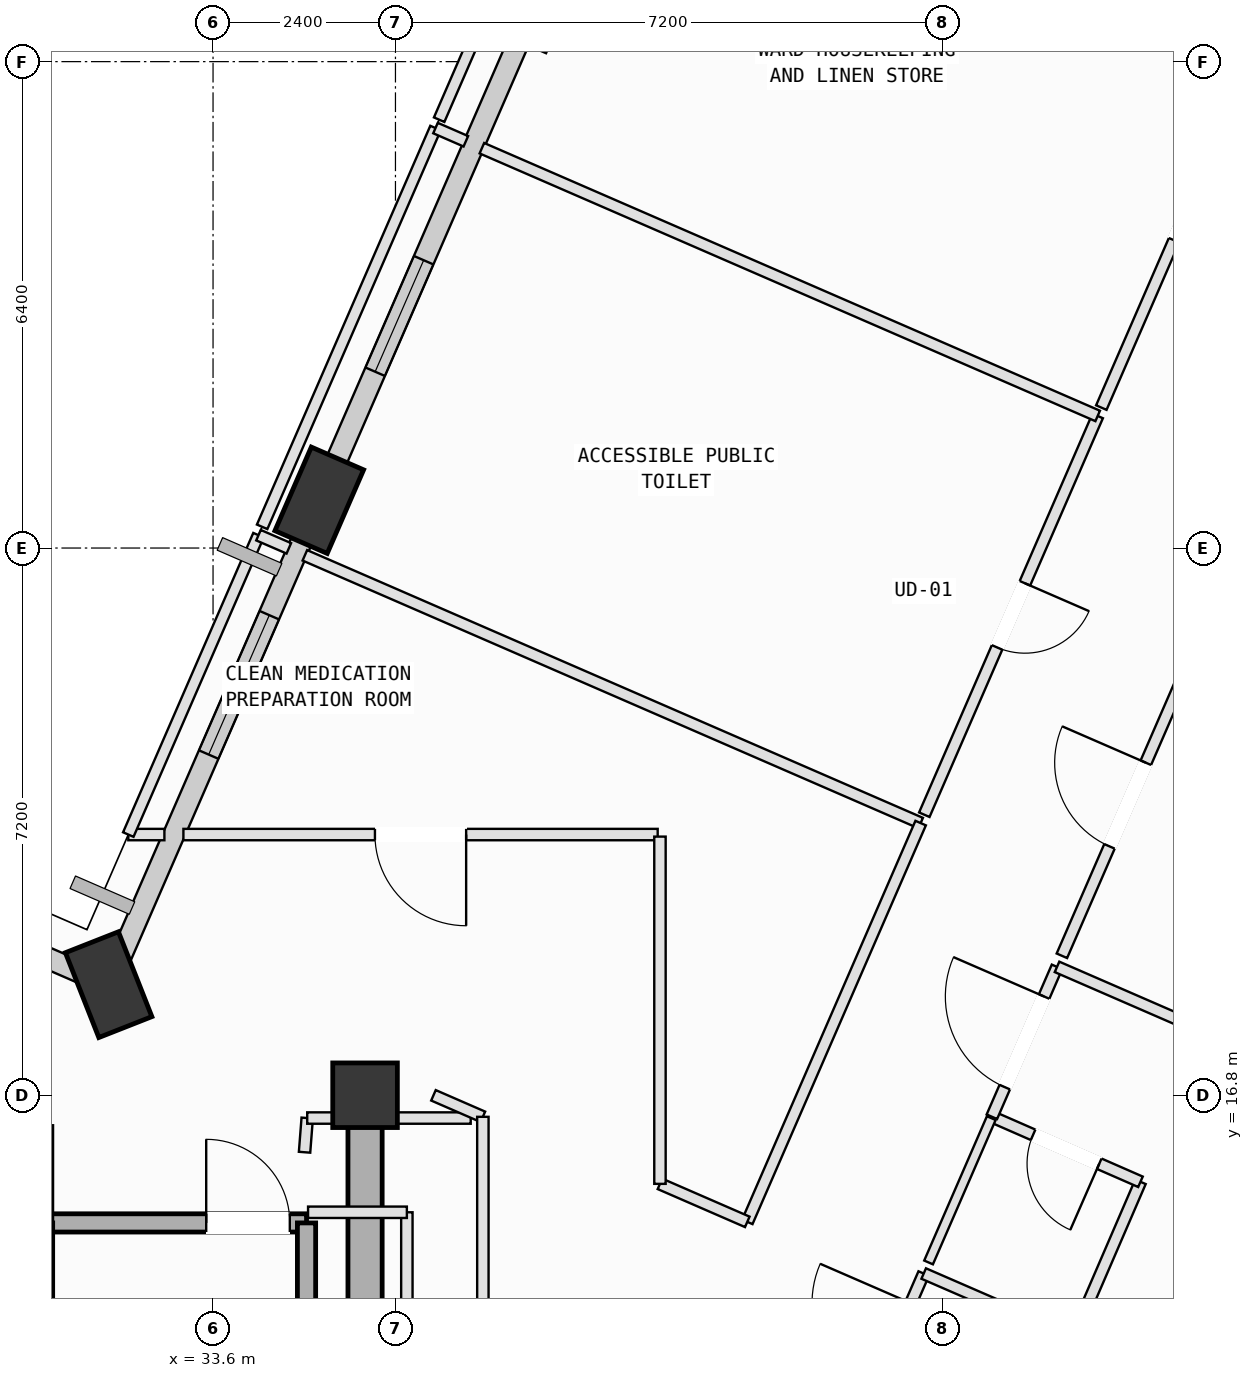
"""IFC4 building model, lengths in metres.
Left out: names, types, materials, properties, quantities, classifications, styles, units other than length and angle.
Written with IfcOpenShell. Run it as: python <this file> out.ifc"""

import sys

from ifc_helpers import new_model, si_unit, direction, frame, frame_2d, origin, origin_2d, place, context, subcontext, project, spatial, rectangle, extrude, element, fill, save


model = new_model("IFC4")
c1 = context("Model", 3, precision=1e-05, world=origin(), true_north=direction((0.0, 1.0)))
c2 = subcontext(c1, "Body", "Model", "MODEL_VIEW")
j1 = project(units=[si_unit("LENGTHUNIT", "METRE"), si_unit("PLANEANGLEUNIT", "RADIAN")], contexts=[c1])
p1 = place(None, origin())
s1 = spatial("IfcSite", under=j1, at=p1, CompositionType="ELEMENT")
p2 = place(p1, origin())
s2 = spatial("IfcBuilding", under=s1, at=p2, CompositionType="ELEMENT")
p3 = place(p2, frame((0.0, 0.0, 320.6)))
s3 = spatial("IfcBuildingStorey", under=s2, at=p3, CompositionType="ELEMENT", Elevation=320.6)
p4 = place(p3, frame((35.6, 16.8, 0.0), z_axis=(0.0, 0.0, 1.0), x_axis=(1.0, 0.0, 0.0)))
e1 = element("IfcColumn", 1, at=p4, inside=s3, PredefinedType="COLUMN", context=c2, shape_type="SweptSolid", body=[
    extrude(rectangle(XDim=0.85, YDim=0.85, at=origin_2d()), origin(), (0.0, 0.0, 1.0), 4.0),
])
for number, where, z_axis, x_axis in (
    (2, (34.998, 24.628, 0.002), (0.0, 0.0, 1.0), (0.399, 0.917, 0.0)),
    (3, (32.226, 18.255, 0.002), (0.0, 0.0, 1.0), (-0.367, 0.93, 0.0)),
):
    element("IfcColumn", number, at=place(p3, frame(where, z_axis=z_axis, x_axis=x_axis)), inside=s3, PredefinedType="COLUMN", context=c2, shape_type="SweptSolid", body=[
        extrude(rectangle(XDim=1.2, YDim=0.75, at=origin_2d()), origin(), (0.0, 0.0, 1.0), 3.996),
    ])
p5 = place(p3, frame((35.156, 24.993, 0.0), z_axis=(0.0, 0.0, 1.0), x_axis=(0.398758169539, 0.917056117272, 0.0)))
e4 = element("IfcWall", 4, at=p5, inside=s3, PredefinedType="SOLIDWALL", context=c2, shape_type="SweptSolid", body=[
    extrude(rectangle(XDim=6.405, YDim=0.28, at=frame_2d((3.202, 0.0))), origin(), (0.0, 0.0, 1.0), 3.265),
])
p6 = place(p5, frame((1.447, 0.0, 0.75)))
e5 = element("IfcOpeningElement", 5, at=p6, cuts=e4, PredefinedType="OPENING", context=c2, shape_type="SweptSolid", body=[
    extrude(rectangle(XDim=1.6, YDim=1.95, at=frame_2d((0.8, 0.975))), frame((0.0, 0.15, 0.0), z_axis=(0.0, -1.0, 0.0), x_axis=(1.0, 0.0, 0.0)), (0.0, 0.0, 1.0), 0.3),
])
p7 = place(p3, frame((32.385, 18.619, 0.0), z_axis=(0.0, 0.0, 1.0), x_axis=(0.398753668733, 0.917058074318, 0.0)))
e6 = element("IfcWall", 6, at=p7, inside=s3, PredefinedType="SOLIDWALL", context=c2, shape_type="SweptSolid", body=[
    extrude(rectangle(XDim=6.155, YDim=0.28, at=frame_2d((3.078, 0.0))), origin(), (0.0, 0.0, 1.0), 3.265),
])
p8 = place(p7, frame((2.904, 0.0, 0.75)))
e7 = element("IfcOpeningElement", 7, at=p8, cuts=e6, PredefinedType="OPENING", context=c2, shape_type="SweptSolid", body=[
    extrude(rectangle(XDim=2.0, YDim=1.95, at=frame_2d((1.0, 0.975))), frame((0.0, 0.15, 0.0), z_axis=(0.0, -1.0, 0.0), x_axis=(1.0, 0.0, 0.0)), (0.0, 0.0, 1.0), 0.3),
])
p9 = place(p3, frame((25.484, 21.187, 0.0), z_axis=(0.0, 0.0, 1.0), x_axis=(0.917060568388, -0.398747932794, 0.0)))
e8 = element("IfcWall", 8, at=p9, inside=s3, PredefinedType="SOLIDWALL", context=c2, shape_type="SweptSolid", body=[
    extrude(rectangle(XDim=6.955, YDim=0.28, at=frame_2d((3.478, 0.0))), origin(), (0.0, 0.0, 1.0), 2.765),
])
p10 = place(p3, frame((31.37, 15.12, 0.0), z_axis=(0.0, 0.0, 1.0), x_axis=(1.0, 0.0, 0.0)))
e9 = element("IfcWall", 9, at=p10, inside=s3, PredefinedType="SOLIDWALL", context=c2, shape_type="SweptSolid", body=[
    extrude(rectangle(XDim=3.46, YDim=0.24, at=frame_2d((1.73, 0.0))), origin(), (0.0, 0.0, 1.0), 3.78),
])
p11 = place(p10, frame((2.14, 0.0, 0.0)))
e10 = element("IfcOpeningElement", 10, at=p11, cuts=e9, PredefinedType="OPENING", context=c2, shape_type="SweptSolid", body=[
    extrude(rectangle(XDim=1.1, YDim=2.15, at=frame_2d((0.55, 1.075))), frame((0.0, 0.13, 0.0), z_axis=(0.0, -1.0, 0.0), x_axis=(1.0, 0.0, 0.0)), (0.0, 0.0, 1.0), 0.26),
])
for number, where, z_axis, x_axis in (
    (11, (34.83, 15.12, 0.0), (0.0, 0.0, 1.0), (0.0, -1.0, 0.0)),
    (12, (31.37, 8.025, 0.0), (0.0, 0.0, 1.0), (0.0, 1.0, 0.0)),
):
    element("IfcWall", number, at=place(p3, frame(where, z_axis=z_axis, x_axis=x_axis)), inside=s3, PredefinedType="SOLIDWALL", context=c2, shape_type="SweptSolid", body=[
        extrude(rectangle(XDim=7.095, YDim=0.24, at=frame_2d((3.548, 0.0))), origin(), (0.0, 0.0, 1.0), 3.78),
    ])
p12 = place(p3, frame((35.6, 7.8, 0.0), z_axis=(0.0, 0.0, 1.0), x_axis=(0.0, 1.0, 0.0)))
e13 = element("IfcWall", 13, at=p12, inside=s3, PredefinedType="SHEAR", context=c2, shape_type="SweptSolid", body=[
    extrude(rectangle(XDim=9.0, YDim=0.45, at=frame_2d((4.5, 0.0))), origin(), (0.0, 0.0, 1.0), 3.78),
])
p13 = place(p3, frame((42.093, 12.482, 0.0), z_axis=(0.0, 0.0, 1.0), x_axis=(0.398518519728, 0.917160285574, 0.0)))
e14 = element("IfcWall", 14, at=p13, inside=s3, PredefinedType="PARTITIONING", context=c2, shape_type="SweptSolid", body=[
    extrude(rectangle(XDim=2.15, YDim=0.15, at=frame_2d((1.075, 0.0))), origin(), (0.0, 0.0, 1.0), 3.78),
])
p14 = place(p13, frame((0.425, 0.0, 0.0)))
e15 = element("IfcOpeningElement", 15, at=p14, cuts=e14, PredefinedType="OPENING", context=c2, shape_type="SweptSolid", body=[
    extrude(rectangle(XDim=1.3, YDim=2.15, at=frame_2d((0.65, 1.075))), frame((0.0, 0.085, 0.0), z_axis=(0.0, -1.0, 0.0), x_axis=(1.0, 0.0, 0.0)), (0.0, 0.0, 1.0), 0.17),
])
p15 = place(p3, frame((42.95, 14.454, 0.0), z_axis=(0.0, 0.0, 1.0), x_axis=(0.917043017742, -0.398788294224, 0.0)))
e16 = element("IfcWall", 16, at=p15, inside=s3, PredefinedType="PARTITIONING", context=c2, shape_type="SweptSolid", body=[
    extrude(rectangle(XDim=7.465, YDim=0.15, at=frame_2d((3.733, 0.0))), origin(), (0.0, 0.0, 1.0), 3.78),
])
p16 = place(p3, frame((44.976, 13.747, 0.0), z_axis=(0.0, 0.0, 1.0), x_axis=(0.396236327193, 0.918148557159, 0.0)))
e17 = element("IfcWall", 17, at=p16, inside=s3, PredefinedType="PARTITIONING", context=c2, shape_type="SweptSolid", body=[
    extrude(rectangle(XDim=2.084, YDim=0.15, at=frame_2d((1.042, 0.0))), origin(), (0.0, 0.0, 1.0), 3.78),
])
p17 = place(p3, frame((45.802, 15.661, 0.0), z_axis=(0.0, 0.0, 1.0), x_axis=(-0.916010257987, 0.401154842003, 0.0)))
e18 = element("IfcWall", 18, at=p17, inside=s3, PredefinedType="PARTITIONING", context=c2, shape_type="SweptSolid", body=[
    extrude(rectangle(XDim=2.134, YDim=0.15, at=frame_2d((1.067, 0.0))), origin(), (0.0, 0.0, 1.0), 3.78),
])
p18 = place(p17, frame((0.592, 0.0, 0.0)))
e19 = element("IfcOpeningElement", 19, at=p18, cuts=e18, PredefinedType="OPENING", context=c2, shape_type="SweptSolid", body=[
    extrude(rectangle(XDim=0.95, YDim=2.1, at=frame_2d((0.475, 1.05))), frame((0.0, 0.085, 0.0), z_axis=(0.0, -1.0, 0.0), x_axis=(1.0, 0.0, 0.0)), (0.0, 0.0, 1.0), 0.17),
])
p19 = place(p3, frame((43.847, 16.517, 0.0), z_axis=(0.0, 0.0, 1.0), x_axis=(0.398655528378, 0.917100741301, 0.0)))
e20 = element("IfcWall", 20, at=p19, inside=s3, PredefinedType="PARTITIONING", context=c2, shape_type="SweptSolid", body=[
    extrude(rectangle(XDim=2.15, YDim=0.15, at=frame_2d((1.075, 0.0))), origin(), (0.0, 0.0, 1.0), 3.78),
])
p20 = place(p19, frame((0.425, 0.0, 0.0)))
e21 = element("IfcOpeningElement", 21, at=p20, cuts=e20, PredefinedType="OPENING", context=c2, shape_type="SweptSolid", body=[
    extrude(rectangle(XDim=1.3, YDim=2.15, at=frame_2d((0.65, 1.075))), frame((0.0, 0.085, 0.0), z_axis=(0.0, -1.0, 0.0), x_axis=(1.0, 0.0, 0.0)), (0.0, 0.0, 1.0), 0.17),
])
p21 = place(p3, frame((44.704, 18.489, 0.0), z_axis=(0.0, 0.0, 1.0), x_axis=(0.917037556052, -0.398800853547, 0.0)))
e22 = element("IfcWall", 22, at=p21, inside=s3, PredefinedType="PARTITIONING", context=c2, shape_type="SweptSolid", body=[
    extrude(rectangle(XDim=9.436, YDim=0.15, at=frame_2d((4.718, 0.0))), origin(), (0.0, 0.0, 1.0), 3.78),
])
p22 = place(p3, frame((43.014, 14.6, 0.0), z_axis=(0.0, 0.0, 1.0), x_axis=(0.398553636867, 0.917145025904, 0.0)))
e23 = element("IfcWall", 23, at=p22, inside=s3, PredefinedType="PARTITIONING", context=c2, shape_type="SweptSolid", body=[
    extrude(rectangle(XDim=2.071, YDim=0.125, at=frame_2d((1.035, 0.0))), origin(), (0.0, 0.0, 1.0), 3.78),
])
p23 = place(p3, frame((44.768, 18.635, 0.0), z_axis=(0.0, 0.0, 1.0), x_axis=(0.398828954963, 0.91702533481, 0.0)))
e24 = element("IfcWall", 24, at=p23, inside=s3, PredefinedType="PARTITIONING", context=c2, shape_type="SweptSolid", body=[
    extrude(rectangle(XDim=4.34, YDim=0.15, at=frame_2d((2.17, 0.0))), origin(), (0.0, 0.0, 1.0), 3.415),
])
p24 = place(p23, frame((1.57, 0.0, 0.0)))
e25 = element("IfcOpeningElement", 25, at=p24, cuts=e24, PredefinedType="OPENING", context=c2, shape_type="SweptSolid", body=[
    extrude(rectangle(XDim=1.2, YDim=2.15, at=frame_2d((0.6, 1.075))), frame((0.0, 0.085, 0.0), z_axis=(0.0, -1.0, 0.0), x_axis=(1.0, 0.0, 0.0)), (0.0, 0.0, 1.0), 0.17),
])
p25 = place(p3, frame((34.804, 16.05, 0.0), z_axis=(0.0, 0.0, 1.0), x_axis=(0.077896068279, 0.996961484987, 0.0)))
e26 = element("IfcWall", 26, at=p25, inside=s3, PredefinedType="PARTITIONING", context=c2, shape_type="SweptSolid", body=[
    extrude(rectangle(XDim=0.451, YDim=0.15, at=frame_2d((0.226, 0.0))), origin(), (0.0, 0.0, 1.0), 3.78),
])
p26 = place(p3, frame((34.839, 16.5, 0.0), z_axis=(0.0, 0.0, 1.0), x_axis=(1.0, 0.0, 0.0)))
e27 = element("IfcWall", 27, at=p26, inside=s3, PredefinedType="PARTITIONING", context=c2, shape_type="SweptSolid", body=[
    extrude(rectangle(XDim=2.151, YDim=0.15, at=frame_2d((1.075, 0.0))), origin(), (0.0, 0.0, 1.0), 2.765),
])
p27 = place(p3, frame((36.5, 16.799, 0.0), z_axis=(0.0, 0.0, 1.0), x_axis=(0.916867333156, -0.399192050762, 0.0)))
e28 = element("IfcWall", 28, at=p27, inside=s3, PredefinedType="PARTITIONING", context=c2, shape_type="SweptSolid", body=[
    extrude(rectangle(XDim=0.709, YDim=0.15, at=frame_2d((0.354, 0.0))), origin(), (0.0, 0.0, 1.0), 3.78),
])
p28 = place(p3, frame((37.15, 16.516, 0.0), z_axis=(0.0, 0.0, 1.0), x_axis=(0.0, -1.0, 0.0)))
e29 = element("IfcWall", 29, at=p28, inside=s3, PredefinedType="PARTITIONING", context=c2, shape_type="SweptSolid", body=[
    extrude(rectangle(XDim=6.238, YDim=0.15, at=frame_2d((3.119, 0.0))), origin(), (0.0, 0.0, 1.0), 3.78),
])
p29 = place(p28, frame((2.58, 0.0, 0.0)))
e30 = element("IfcOpeningElement", 30, at=p29, cuts=e29, PredefinedType="OPENING", context=c2, shape_type="SweptSolid", body=[
    extrude(rectangle(XDim=1.0, YDim=2.12, at=frame_2d((0.5, 1.06))), frame((0.0, 0.085, 0.0), z_axis=(0.0, -1.0, 0.0), x_axis=(1.0, 0.0, 0.0)), (0.0, 0.0, 1.0), 0.17),
])
p30 = place(p3, frame((36.15, 10.712, 0.0), z_axis=(0.0, 0.0, 1.0), x_axis=(0.0, 1.0, 0.0)))
e31 = element("IfcWall", 31, at=p30, inside=s3, PredefinedType="PARTITIONING", context=c2, shape_type="SweptSolid", body=[
    extrude(rectangle(XDim=4.548, YDim=0.15, at=frame_2d((2.274, 0.0))), origin(), (0.0, 0.0, 1.0), 3.78),
])
p31 = place(p3, frame((36.15, 15.26, 0.0), z_axis=(0.0, 0.0, 1.0), x_axis=(-1.0, 0.0, 0.0)))
e32 = element("IfcWall", 32, at=p31, inside=s3, PredefinedType="PARTITIONING", context=c2, shape_type="SweptSolid", body=[
    extrude(rectangle(XDim=1.3, YDim=0.15, at=frame_2d((0.65, 0.0))), origin(), (0.0, 0.0, 1.0), 3.78),
])
p32 = place(p3, frame((39.45, 20.23, 0.0), z_axis=(0.0, 0.0, 1.0), x_axis=(-1.0, 0.0, 0.0)))
e33 = element("IfcWall", 33, at=p32, inside=s3, PredefinedType="PARTITIONING", context=c2, shape_type="SweptSolid", body=[
    extrude(rectangle(XDim=6.24, YDim=0.15, at=frame_2d((3.12, 0.0))), origin(), (0.0, 0.0, 1.0), 3.78),
])
p33 = place(p32, frame((2.52, 0.0, 0.0)))
e34 = element("IfcOpeningElement", 34, at=p33, cuts=e33, PredefinedType="OPENING", context=c2, shape_type="SweptSolid", body=[
    extrude(rectangle(XDim=1.2, YDim=2.15, at=frame_2d((0.6, 1.075))), frame((0.0, 0.085, 0.0), z_axis=(0.0, -1.0, 0.0), x_axis=(1.0, 0.0, 0.0)), (0.0, 0.0, 1.0), 0.17),
])
p34 = place(p3, frame((32.96, 20.23, 0.0), z_axis=(0.0, 0.0, 1.0), x_axis=(-1.0, 0.0, 0.0)))
e35 = element("IfcWall", 35, at=p34, inside=s3, PredefinedType="PARTITIONING", context=c2, shape_type="SweptSolid", body=[
    extrude(rectangle(XDim=0.475, YDim=0.15, at=frame_2d((0.237, 0.0))), origin(), (0.0, 0.0, 1.0), 3.78),
])
p35 = place(p3, frame((32.485, 20.23, 0.0), z_axis=(0.0, 0.0, 1.0), x_axis=(0.398784305347, 0.917044752348, 0.0)))
e36 = element("IfcWall", 36, at=p35, inside=s3, PredefinedType="PARTITIONING", context=c2, shape_type="SweptSolid", body=[
    extrude(rectangle(XDim=4.295, YDim=0.15, at=frame_2d((2.147, 0.0))), origin(), (0.0, 0.0, 1.0), 3.78),
])
p36 = place(p3, frame((34.198, 24.169, 0.0), z_axis=(0.0, 0.0, 1.0), x_axis=(0.917569282622, -0.397575919276, 0.0)))
e37 = element("IfcWall", 37, at=p36, inside=s3, PredefinedType="PARTITIONING", context=c2, shape_type="SweptSolid", body=[
    extrude(rectangle(XDim=0.435, YDim=0.15, at=frame_2d((0.217, 0.0))), origin(), (0.0, 0.0, 1.0), 3.78),
])
p37 = place(p3, frame((34.808, 23.904, 0.0), z_axis=(0.0, 0.0, 1.0), x_axis=(0.917052481723, -0.398766530398, 0.0)))
e38 = element("IfcWall", 38, at=p37, inside=s3, PredefinedType="PARTITIONING", context=c2, shape_type="SweptSolid", body=[
    extrude(rectangle(XDim=8.835, YDim=0.15, at=frame_2d((4.417, 0.0))), origin(), (0.0, 0.0, 1.0), 3.78),
])
p38 = place(p3, frame((42.91, 20.381, 0.0), z_axis=(0.0, 0.0, 1.0), x_axis=(-0.398677741034, -0.917091085337, 0.0)))
e39 = element("IfcWall", 39, at=p38, inside=s3, PredefinedType="PARTITIONING", context=c2, shape_type="SweptSolid", body=[
    extrude(rectangle(XDim=5.721, YDim=0.15, at=frame_2d((2.861, 0.0))), origin(), (0.0, 0.0, 1.0), 3.78),
])
p39 = place(p3, frame((40.629, 15.134, 0.0), z_axis=(0.0, 0.0, 1.0), x_axis=(-0.916933705125, 0.399039572481, 0.0)))
e40 = element("IfcWall", 40, at=p39, inside=s3, PredefinedType="PARTITIONING", context=c2, shape_type="SweptSolid", body=[
    extrude(rectangle(XDim=1.253, YDim=0.15, at=frame_2d((0.626, 0.0))), origin(), (0.0, 0.0, 1.0), 3.78),
])
p40 = place(p3, frame((39.48, 15.634, 0.0), z_axis=(0.0, 0.0, 1.0), x_axis=(0.0, 1.0, 0.0)))
e41 = element("IfcWall", 41, at=p40, inside=s3, PredefinedType="PARTITIONING", context=c2, shape_type="SweptSolid", body=[
    extrude(rectangle(XDim=4.569, YDim=0.15, at=frame_2d((2.284, 0.0))), origin(), (0.0, 0.0, 1.0), 3.78),
])
p41 = place(p3, frame((45.239, 25.738, 0.0), z_axis=(0.0, 0.0, 1.0), x_axis=(-0.398677741034, -0.917091085337, 0.0)))
e42 = element("IfcWall", 42, at=p41, inside=s3, PredefinedType="PARTITIONING", context=c2, shape_type="SweptSolid", body=[
    extrude(rectangle(XDim=5.721, YDim=0.15, at=frame_2d((2.861, 0.0))), origin(), (0.0, 0.0, 1.0), 3.78),
])
p42 = place(p41, frame((2.401, 0.0, 0.0)))
e43 = element("IfcOpeningElement", 43, at=p42, cuts=e42, PredefinedType="OPENING", context=c2, shape_type="SweptSolid", body=[
    extrude(rectangle(XDim=0.92, YDim=2.1, at=frame_2d((0.46, 1.05))), frame((0.0, 0.085, 0.0), z_axis=(0.0, -1.0, 0.0), x_axis=(1.0, 0.0, 0.0)), (0.0, 0.0, 1.0), 0.17),
])
p43 = place(p3, frame((34.246, 24.279, 0.0), z_axis=(0.0, 0.0, 1.0), x_axis=(0.398693343221, 0.917084302598, 0.0)))
e44 = element("IfcWall", 44, at=p43, inside=s3, PredefinedType="PARTITIONING", context=c2, shape_type="SweptSolid", body=[
    extrude(rectangle(XDim=5.721, YDim=0.15, at=frame_2d((2.861, 0.0))), origin(), (0.0, 0.0, 1.0), 3.78),
])
p44 = place(p3, frame((36.527, 29.526, 0.0), z_axis=(0.0, 0.0, 1.0), x_axis=(0.916748651636, -0.399464528742, 0.0)))
e45 = element("IfcWall", 45, at=p44, inside=s3, PredefinedType="PARTITIONING", context=c2, shape_type="SweptSolid", body=[
    extrude(rectangle(XDim=0.435, YDim=0.15, at=frame_2d((0.218, 0.0))), origin(), (0.0, 0.0, 1.0), 3.78),
])
p45 = place(p3, frame((37.137, 29.261, 0.0), z_axis=(0.0, 0.0, 1.0), x_axis=(0.917056875857, -0.398756424957, 0.0)))
e46 = element("IfcWall", 46, at=p45, inside=s3, PredefinedType="PARTITIONING", context=c2, shape_type="SweptSolid", body=[
    extrude(rectangle(XDim=8.835, YDim=0.15, at=frame_2d((4.417, 0.0))), origin(), (0.0, 0.0, 1.0), 3.78),
])
p46 = place(p3, frame((47.568, 31.095, 0.0), z_axis=(0.0, 0.0, 1.0), x_axis=(-0.398677741034, -0.917091085337, 0.0)))
e47 = element("IfcWall", 47, at=p46, inside=s3, PredefinedType="PARTITIONING", context=c2, shape_type="SweptSolid", body=[
    extrude(rectangle(XDim=5.721, YDim=0.15, at=frame_2d((2.861, 0.0))), origin(), (0.0, 0.0, 1.0), 3.78),
])
p47 = place(p46, frame((2.401, 0.0, 0.0)))
e48 = element("IfcOpeningElement", 48, at=p47, cuts=e47, PredefinedType="OPENING", context=c2, shape_type="SweptSolid", body=[
    extrude(rectangle(XDim=0.92, YDim=2.1, at=frame_2d((0.46, 1.05))), frame((0.0, 0.085, 0.0), z_axis=(0.0, -1.0, 0.0), x_axis=(1.0, 0.0, 0.0)), (0.0, 0.0, 1.0), 0.17),
])
p48 = place(p3, frame((36.575, 29.636, 0.0), z_axis=(0.0, 0.0, 1.0), x_axis=(0.398677741034, 0.917091085337, 0.0)))
e49 = element("IfcWall", 49, at=p48, inside=s3, PredefinedType="PARTITIONING", context=c2, shape_type="SweptSolid", body=[
    extrude(rectangle(XDim=5.721, YDim=0.15, at=frame_2d((2.861, 0.0))), origin(), (0.0, 0.0, 1.0), 3.78),
])
p49 = place(p6, origin())
e50 = element("IfcWindow", 50, at=p49, inside=s3, PartitioningType="SINGLE_PANEL", PredefinedType="WINDOW", context=c2, shape_type="SweptSolid", body=[
    extrude(rectangle(XDim=1.6, YDim=1.95, at=frame_2d((0.8, 0.975))), frame((0.0, 0.03, 0.0), z_axis=(0.0, -1.0, 0.0), x_axis=(1.0, 0.0, 0.0)), (0.0, 0.0, 1.0), 0.06),
])
fill(e5, e50)
p50 = place(p8, origin())
e51 = element("IfcWindow", 51, at=p50, inside=s3, PartitioningType="SINGLE_PANEL", PredefinedType="WINDOW", context=c2, shape_type="SweptSolid", body=[
    extrude(rectangle(XDim=2.0, YDim=1.95, at=frame_2d((1.0, 0.975))), frame((0.0, 0.03, 0.0), z_axis=(0.0, -1.0, 0.0), x_axis=(1.0, 0.0, 0.0)), (0.0, 0.0, 1.0), 0.06),
])
fill(e7, e51)
p51 = place(p11, origin())
e52 = element("IfcDoor", 52, at=p51, inside=s3, OperationType="SINGLE_SWING_LEFT", PredefinedType="DOOR", context=c2, shape_type="SweptSolid", body=[
    extrude(rectangle(XDim=1.1, YDim=2.15, at=frame_2d((0.55, 1.075))), frame((0.0, 0.025, 0.0), z_axis=(0.0, -1.0, 0.0), x_axis=(1.0, 0.0, 0.0)), (0.0, 0.0, 1.0), 0.05),
])
fill(e10, e52)
p52 = place(p20, origin())
e53 = element("IfcDoor", 53, at=p52, inside=s3, OperationType="SINGLE_SWING_RIGHT", PredefinedType="DOOR", context=c2, shape_type="SweptSolid", body=[
    extrude(rectangle(XDim=1.3, YDim=2.15, at=frame_2d((0.65, 1.075))), frame((0.0, 0.025, 0.0), z_axis=(0.0, -1.0, 0.0), x_axis=(1.0, 0.0, 0.0)), (0.0, 0.0, 1.0), 0.05),
])
fill(e21, e53)
p53 = place(p18, origin())
e54 = element("IfcDoor", 54, at=p53, inside=s3, OperationType="SINGLE_SWING_LEFT", PredefinedType="DOOR", context=c2, shape_type="SweptSolid", body=[
    extrude(rectangle(XDim=0.95, YDim=2.1, at=frame_2d((0.475, 1.05))), frame((0.0, 0.025, 0.0), z_axis=(0.0, -1.0, 0.0), x_axis=(1.0, 0.0, 0.0)), (0.0, 0.0, 1.0), 0.05),
])
fill(e19, e54)
p54 = place(p24, origin())
e55 = element("IfcDoor", 55, at=p54, inside=s3, OperationType="SINGLE_SWING_RIGHT", PredefinedType="DOOR", context=c2, shape_type="SweptSolid", body=[
    extrude(rectangle(XDim=1.2, YDim=2.15, at=frame_2d((0.6, 1.075))), frame((0.0, 0.025, 0.0), z_axis=(0.0, -1.0, 0.0), x_axis=(1.0, 0.0, 0.0)), (0.0, 0.0, 1.0), 0.05),
])
fill(e25, e55)
p55 = place(p33, origin())
e56 = element("IfcDoor", 56, at=p55, inside=s3, OperationType="SINGLE_SWING_LEFT", PredefinedType="DOOR", context=c2, shape_type="SweptSolid", body=[
    extrude(rectangle(XDim=1.2, YDim=2.15, at=frame_2d((0.6, 1.075))), frame((0.0, 0.025, 0.0), z_axis=(0.0, -1.0, 0.0), x_axis=(1.0, 0.0, 0.0)), (0.0, 0.0, 1.0), 0.05),
])
fill(e34, e56)
p56 = place(p42, origin())
e57 = element("IfcDoor", 57, at=p56, inside=s3, OperationType="SINGLE_SWING_LEFT", PredefinedType="DOOR", context=c2, shape_type="SweptSolid", body=[
    extrude(rectangle(XDim=0.92, YDim=2.1, at=frame_2d((0.46, 1.05))), frame((0.0, 0.025, 0.0), z_axis=(0.0, -1.0, 0.0), x_axis=(1.0, 0.0, 0.0)), (0.0, 0.0, 1.0), 0.05),
])
fill(e43, e57)
p57 = place(p47, origin())
e58 = element("IfcDoor", 58, at=p57, inside=s3, OperationType="SINGLE_SWING_LEFT", PredefinedType="DOOR", context=c2, shape_type="SweptSolid", body=[
    extrude(rectangle(XDim=0.92, YDim=2.1, at=frame_2d((0.46, 1.05))), frame((0.0, 0.025, 0.0), z_axis=(0.0, -1.0, 0.0), x_axis=(1.0, 0.0, 0.0)), (0.0, 0.0, 1.0), 0.05),
])
fill(e48, e58)
save(model, sys.argv[1])
